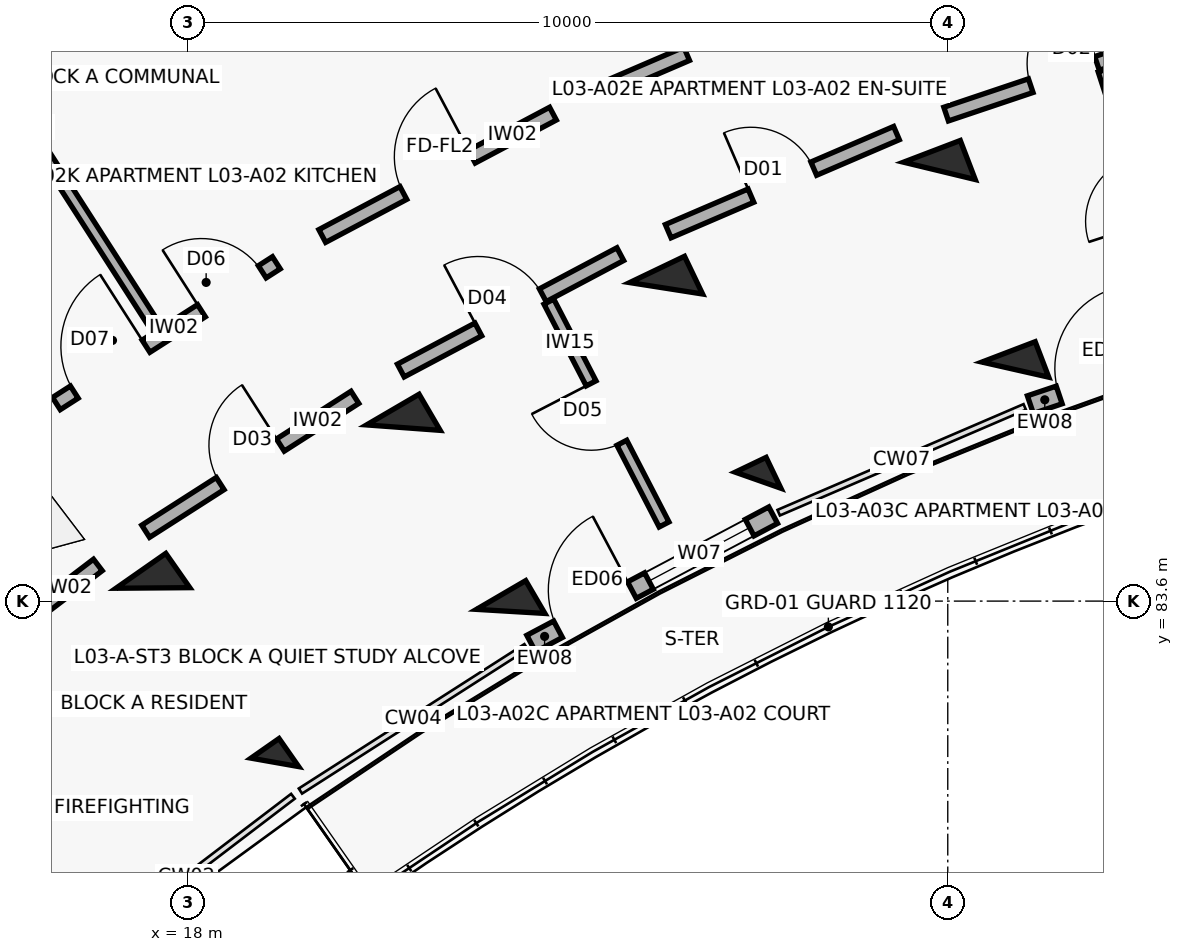
"""IFC4 building model, lengths in metres.
Left out: names, types, materials, properties, quantities, classifications, styles, units other than length and angle.
Written with IfcOpenShell. Run it as: python <this file> out.ifc"""

import sys

from ifc_helpers import new_model, si_unit, direction, frame, frame_2d, origin, origin_2d, place, context, subcontext, project, spatial, rectangle, extrude, element, fill, save


model = new_model("IFC4")
c1 = context("Model", 3, precision=1e-05, world=origin(), true_north=direction((0.0, 1.0)))
c2 = subcontext(c1, "Body", "Model", "MODEL_VIEW")
j1 = project(units=[si_unit("LENGTHUNIT", "METRE"), si_unit("PLANEANGLEUNIT", "RADIAN")], contexts=[c1])
p1 = place(None, origin())
s1 = spatial("IfcSite", under=j1, at=p1, CompositionType="ELEMENT")
p2 = place(p1, origin())
s2 = spatial("IfcBuilding", under=s1, at=p2, CompositionType="ELEMENT")
p3 = place(p2, frame((0.0, 0.0, 11.2)))
s3 = spatial("IfcBuildingStorey", under=s2, at=p3, CompositionType="ELEMENT", Elevation=11.2)
p4 = place(p3, frame((19.146, 81.478, 0.0), z_axis=(0.0, 0.0, 1.0), x_axis=(-0.573004420611, 0.819552276527, 0.0)))
e1 = element("IfcColumn", 1, at=p4, inside=s3, PredefinedType="COLUMN", context=c2, shape_type="SweptSolid", body=[
    extrude(rectangle(XDim=0.45, YDim=0.45, at=origin_2d()), origin(), (0.0, 0.0, 1.0), 3.1),
])
p5 = place(p3, frame((17.542, 83.773, 0.0), z_axis=(0.0, 0.0, 1.0), x_axis=(-0.573004420611, 0.819552276527, 0.0)))
e2 = element("IfcColumn", 2, at=p5, inside=s3, PredefinedType="COLUMN", context=c2, shape_type="SweptSolid", body=[
    extrude(rectangle(XDim=0.55, YDim=0.8, at=origin_2d()), origin(), (0.0, 0.0, 1.0), 3.1),
])
p6 = place(p3, frame((22.249, 83.464, 0.0), z_axis=(0.0, 0.0, 1.0), x_axis=(-0.504226211181, 0.863571611366, 0.0)))
e3 = element("IfcColumn", 3, at=p6, inside=s3, PredefinedType="COLUMN", context=c2, shape_type="SweptSolid", body=[
    extrude(rectangle(XDim=0.5, YDim=0.75, at=origin_2d()), origin(), (0.0, 0.0, 1.0), 3.1),
])
for number, where, z_axis, x_axis in (
    (4, (20.837, 85.882, 0.0), (0.0, 0.0, 1.0), (-0.504, 0.864, 0.0)),
    (5, (17.873, 90.96, 0.0), (0.0, 0.0, 1.0), (-0.504, 0.864, 0.0)),
):
    element("IfcColumn", number, at=place(p3, frame(where, z_axis=z_axis, x_axis=x_axis)), inside=s3, PredefinedType="COLUMN", context=c2, shape_type="SweptSolid", body=[
        extrude(rectangle(XDim=0.55, YDim=0.8, at=origin_2d()), origin(), (0.0, 0.0, 1.0), 3.1),
    ])
p7 = place(p3, frame((25.504, 85.191, 0.0), z_axis=(0.0, 0.0, 1.0), x_axis=(-0.432085748802, 0.901832526405, 0.0)))
e6 = element("IfcColumn", 6, at=p7, inside=s3, PredefinedType="COLUMN", context=c2, shape_type="SweptSolid", body=[
    extrude(rectangle(XDim=0.45, YDim=0.45, at=origin_2d()), origin(), (0.0, 0.0, 1.0), 3.1),
])
p8 = place(p3, frame((24.294, 87.716, 0.0), z_axis=(0.0, 0.0, 1.0), x_axis=(-0.432085748802, 0.901832526405, 0.0)))
e7 = element("IfcColumn", 7, at=p8, inside=s3, PredefinedType="COLUMN", context=c2, shape_type="SweptSolid", body=[
    extrude(rectangle(XDim=0.55, YDim=0.8, at=origin_2d()), origin(), (0.0, 0.0, 1.0), 3.1),
])
p9 = place(p3, frame((28.889, 86.646, 0.0), z_axis=(0.0, 0.0, 1.0), x_axis=(-0.357064076459, 0.934079892355, 0.0)))
e8 = element("IfcColumn", 8, at=p9, inside=s3, PredefinedType="COLUMN", context=c2, shape_type="SweptSolid", body=[
    extrude(rectangle(XDim=0.5, YDim=0.75, at=origin_2d()), origin(), (0.0, 0.0, 1.0), 3.1),
])
p10 = place(p3, frame((27.889, 89.261, 0.0), z_axis=(0.0, 0.0, 1.0), x_axis=(-0.357064076459, 0.934079892355, 0.0)))
e9 = element("IfcColumn", 9, at=p10, inside=s3, PredefinedType="COLUMN", context=c2, shape_type="SweptSolid", body=[
    extrude(rectangle(XDim=0.55, YDim=0.8, at=origin_2d()), origin(), (0.0, 0.0, 1.0), 3.1),
])
p11 = place(p3, frame((22.519, 83.042, 0.0), z_axis=(0.0, 0.0, 1.0), x_axis=(0.883438308286, 0.468547495407, 0.0)))
e10 = element("IfcWall", 10, at=p11, inside=s3, PredefinedType="SOLIDWALL", context=c2, shape_type="SweptSolid", body=[
    extrude(rectangle(XDim=3.604, YDim=0.245, at=frame_2d((1.802, 0.0))), origin(), (0.0, 0.0, 1.0), 2.25),
])
p12 = place(p11, frame((0.4, 0.0, 0.0)))
e11 = element("IfcOpeningElement", 11, at=p12, cuts=e10, PredefinedType="OPENING", context=c2, shape_type="SweptSolid", body=[
    extrude(rectangle(XDim=1.1, YDim=2.15, at=frame_2d((0.55, 1.075))), frame((0.0, 0.133, 0.0), z_axis=(0.0, -1.0, 0.0), x_axis=(1.0, 0.0, 0.0)), (0.0, 0.0, 1.0), 0.265),
])
p13 = place(p11, frame((1.754, 0.0, 0.35)))
e12 = element("IfcOpeningElement", 12, at=p13, cuts=e10, PredefinedType="OPENING", context=c2, shape_type="SweptSolid", body=[
    extrude(rectangle(XDim=1.5, YDim=1.65, at=frame_2d((0.75, 0.825))), frame((0.0, 0.133, 0.0), z_axis=(0.0, -1.0, 0.0), x_axis=(1.0, 0.0, 0.0)), (0.0, 0.0, 1.0), 0.265),
])
p14 = place(p3, frame((29.087, 86.185, 0.0), z_axis=(0.0, 0.0, 1.0), x_axis=(0.947880824442, 0.318625081649, 0.0)))
e13 = element("IfcWall", 13, at=p14, inside=s3, PredefinedType="SOLIDWALL", context=c2, shape_type="SweptSolid", body=[
    extrude(rectangle(XDim=3.604, YDim=0.245, at=frame_2d((1.802, 0.0))), origin(), (0.0, 0.0, 1.0), 2.25),
])
p15 = place(p14, frame((0.4, 0.0, 0.0)))
e14 = element("IfcOpeningElement", 14, at=p15, cuts=e13, PredefinedType="OPENING", context=c2, shape_type="SweptSolid", body=[
    extrude(rectangle(XDim=1.1, YDim=2.15, at=frame_2d((0.55, 1.075))), frame((0.0, 0.133, 0.0), z_axis=(0.0, -1.0, 0.0), x_axis=(1.0, 0.0, 0.0)), (0.0, 0.0, 1.0), 0.265),
])
p16 = place(p14, frame((1.754, 0.0, 0.35)))
e15 = element("IfcOpeningElement", 15, at=p16, cuts=e13, PredefinedType="OPENING", context=c2, shape_type="SweptSolid", body=[
    extrude(rectangle(XDim=1.5, YDim=1.65, at=frame_2d((0.75, 0.825))), frame((0.0, 0.133, 0.0), z_axis=(0.0, -1.0, 0.0), x_axis=(1.0, 0.0, 0.0)), (0.0, 0.0, 1.0), 0.265),
])
p17 = place(p3, frame((14.329, 82.18, 0.0), z_axis=(0.0, 0.0, 1.0), x_axis=(0.795501577908, 0.605951515838, 0.0)))
e16 = element("IfcWall", 16, at=p17, inside=s3, PredefinedType="SOLIDWALL", context=c2, shape_type="SweptSolid", body=[
    extrude(rectangle(XDim=3.129, YDim=0.19, at=frame_2d((1.564, 0.0))), origin(), (0.0, 0.0, 1.0), 2.08),
])
p18 = place(p17, frame((1.004, 0.0, 0.0)))
e17 = element("IfcOpeningElement", 17, at=p18, cuts=e16, PredefinedType="OPENING", context=c2, shape_type="SweptSolid", body=[
    extrude(rectangle(XDim=1.12, YDim=2.15, at=frame_2d((0.56, 1.075))), frame((0.0, 0.105, 0.0), z_axis=(0.0, -1.0, 0.0), x_axis=(1.0, 0.0, 0.0)), (0.0, 0.0, 1.0), 0.21),
])
p19 = place(p3, frame((16.272, 86.199, 0.0), z_axis=(0.0, 0.0, 1.0), x_axis=(0.842257205985, 0.539075874963, 0.0)))
e18 = element("IfcWall", 18, at=p19, inside=s3, PredefinedType="SOLIDWALL", context=c2, shape_type="SweptSolid", body=[
    extrude(rectangle(XDim=3.436, YDim=0.19, at=frame_2d((1.718, 0.0))), origin(), (0.0, 0.0, 1.0), 2.08),
])
p20 = place(p19, frame((0.28, 0.0, 0.0)))
e19 = element("IfcOpeningElement", 19, at=p20, cuts=e18, PredefinedType="OPENING", context=c2, shape_type="SweptSolid", body=[
    extrude(rectangle(XDim=1.12, YDim=2.15, at=frame_2d((0.56, 1.075))), frame((0.0, 0.105, 0.0), z_axis=(0.0, -1.0, 0.0), x_axis=(1.0, 0.0, 0.0)), (0.0, 0.0, 1.0), 0.21),
])
p21 = place(p19, frame((2.266, 0.0, 0.0)))
e20 = element("IfcOpeningElement", 20, at=p21, cuts=e18, PredefinedType="OPENING", context=c2, shape_type="SweptSolid", body=[
    extrude(rectangle(XDim=0.95, YDim=2.1, at=frame_2d((0.475, 1.05))), frame((0.0, 0.105, 0.0), z_axis=(0.0, -1.0, 0.0), x_axis=(1.0, 0.0, 0.0)), (0.0, 0.0, 1.0), 0.21),
])
p22 = place(p3, frame((17.447, 84.519, 0.0), z_axis=(0.0, 0.0, 1.0), x_axis=(0.842225276846, 0.539125758095, 0.0)))
e21 = element("IfcWall", 21, at=p22, inside=s3, PredefinedType="SOLIDWALL", context=c2, shape_type="SweptSolid", body=[
    extrude(rectangle(XDim=3.269, YDim=0.19, at=frame_2d((1.634, 0.0))), origin(), (0.0, 0.0, 1.0), 2.08),
])
p23 = place(p22, frame((1.164, 0.0, 0.0)))
e22 = element("IfcOpeningElement", 22, at=p23, cuts=e21, PredefinedType="OPENING", context=c2, shape_type="SweptSolid", body=[
    extrude(rectangle(XDim=0.94, YDim=2.1, at=frame_2d((0.47, 1.05))), frame((0.0, 0.105, 0.0), z_axis=(0.0, -1.0, 0.0), x_axis=(1.0, 0.0, 0.0)), (0.0, 0.0, 1.0), 0.21),
])
p24 = place(p3, frame((17.524, 87.288, 0.0), z_axis=(0.0, 0.0, 1.0), x_axis=(-0.540338452216, 0.841447774408, 0.0)))
e23 = element("IfcWall", 23, at=p24, inside=s3, PredefinedType="PARTITIONING", context=c2, shape_type="SweptSolid", body=[
    extrude(rectangle(XDim=7.95, YDim=0.14, at=frame_2d((3.975, 0.0))), origin(), (0.0, 0.0, 1.0), 2.08),
])
p25 = place(p24, frame((6.05, 0.0, 0.0)))
e24 = element("IfcOpeningElement", 24, at=p25, cuts=e23, PredefinedType="OPENING", context=c2, shape_type="SweptSolid", body=[
    extrude(rectangle(XDim=0.92, YDim=2.1, at=frame_2d((0.46, 1.05))), frame((0.0, 0.08, 0.0), z_axis=(0.0, -1.0, 0.0), x_axis=(1.0, 0.0, 0.0)), (0.0, 0.0, 1.0), 0.16),
])
p26 = place(p3, frame((19.77, 88.404, 0.0), z_axis=(0.0, 0.0, 1.0), x_axis=(0.883410853063, 0.468599258099, 0.0)))
e25 = element("IfcWall", 25, at=p26, inside=s3, PredefinedType="SOLIDWALL", context=c2, shape_type="SweptSolid", body=[
    extrude(rectangle(XDim=3.436, YDim=0.19, at=frame_2d((1.718, 0.0))), origin(), (0.0, 0.0, 1.0), 2.08),
])
p27 = place(p26, frame((1.208, 0.0, 0.0)))
e26 = element("IfcOpeningElement", 26, at=p27, cuts=e25, PredefinedType="OPENING", context=c2, shape_type="SweptSolid", body=[
    extrude(rectangle(XDim=1.02, YDim=2.15, at=frame_2d((0.51, 1.075))), frame((0.0, 0.105, 0.0), z_axis=(0.0, -1.0, 0.0), x_axis=(1.0, 0.0, 0.0)), (0.0, 0.0, 1.0), 0.21),
])
p28 = place(p3, frame((20.804, 86.634, 0.0), z_axis=(0.0, 0.0, 1.0), x_axis=(0.883444301944, 0.468536194293, 0.0)))
e27 = element("IfcWall", 27, at=p28, inside=s3, PredefinedType="SOLIDWALL", context=c2, shape_type="SweptSolid", body=[
    extrude(rectangle(XDim=3.269, YDim=0.19, at=frame_2d((1.634, 0.0))), origin(), (0.0, 0.0, 1.0), 2.08),
])
p29 = place(p28, frame((1.154, 0.0, 0.0)))
e28 = element("IfcOpeningElement", 28, at=p29, cuts=e27, PredefinedType="OPENING", context=c2, shape_type="SweptSolid", body=[
    extrude(rectangle(XDim=0.96, YDim=2.1, at=frame_2d((0.48, 1.05))), frame((0.0, 0.105, 0.0), z_axis=(0.0, -1.0, 0.0), x_axis=(1.0, 0.0, 0.0)), (0.0, 0.0, 1.0), 0.21),
])
p30 = place(p3, frame((24.267, 84.608, 0.0), z_axis=(0.0, 0.0, 1.0), x_axis=(-0.459217611894, 0.888323806349, 0.0)))
e29 = element("IfcWall", 29, at=p30, inside=s3, PredefinedType="PARTITIONING", context=c2, shape_type="SweptSolid", body=[
    extrude(rectangle(XDim=3.3, YDim=0.145, at=frame_2d((1.65, 0.0))), origin(), (0.0, 0.0, 1.0), 2.08),
])
p31 = place(p30, frame((1.21, 0.0, 0.0)))
e30 = element("IfcOpeningElement", 30, at=p31, cuts=e29, PredefinedType="OPENING", context=c2, shape_type="SweptSolid", body=[
    extrude(rectangle(XDim=0.88, YDim=2.1, at=frame_2d((0.44, 1.05))), frame((0.0, 0.083, 0.0), z_axis=(0.0, -1.0, 0.0), x_axis=(1.0, 0.0, 0.0)), (0.0, 0.0, 1.0), 0.165),
])
p32 = place(p3, frame((23.437, 90.316, 0.0), z_axis=(0.0, 0.0, 1.0), x_axis=(0.918718172399, 0.394913813008, 0.0)))
e31 = element("IfcWall", 31, at=p32, inside=s3, PredefinedType="SOLIDWALL", context=c2, shape_type="SweptSolid", body=[
    extrude(rectangle(XDim=3.436, YDim=0.19, at=frame_2d((1.718, 0.0))), origin(), (0.0, 0.0, 1.0), 2.08),
])
p33 = place(p32, frame((1.228, 0.0, 0.0)))
e32 = element("IfcOpeningElement", 32, at=p33, cuts=e31, PredefinedType="OPENING", context=c2, shape_type="SweptSolid", body=[
    extrude(rectangle(XDim=0.98, YDim=2.15, at=frame_2d((0.49, 1.075))), frame((0.0, 0.105, 0.0), z_axis=(0.0, -1.0, 0.0), x_axis=(1.0, 0.0, 0.0)), (0.0, 0.0, 1.0), 0.21),
])
p34 = place(p3, frame((24.322, 88.467, 0.0), z_axis=(0.0, 0.0, 1.0), x_axis=(0.918723391052, 0.394901672235, 0.0)))
e33 = element("IfcWall", 33, at=p34, inside=s3, PredefinedType="SOLIDWALL", context=c2, shape_type="SweptSolid", body=[
    extrude(rectangle(XDim=3.269, YDim=0.19, at=frame_2d((1.634, 0.0))), origin(), (0.0, 0.0, 1.0), 2.08),
])
p35 = place(p34, frame((1.184, 0.0, 0.0)))
e34 = element("IfcOpeningElement", 34, at=p35, cuts=e33, PredefinedType="OPENING", context=c2, shape_type="SweptSolid", body=[
    extrude(rectangle(XDim=0.9, YDim=2.1, at=frame_2d((0.45, 1.05))), frame((0.0, 0.105, 0.0), z_axis=(0.0, -1.0, 0.0), x_axis=(1.0, 0.0, 0.0)), (0.0, 0.0, 1.0), 0.21),
])
p36 = place(p3, frame((27.979, 90.008, 0.0), z_axis=(0.0, 0.0, 1.0), x_axis=(0.94787351033, 0.318646839643, 0.0)))
e35 = element("IfcWall", 35, at=p36, inside=s3, PredefinedType="SOLIDWALL", context=c2, shape_type="SweptSolid", body=[
    extrude(rectangle(XDim=3.269, YDim=0.19, at=frame_2d((1.634, 0.0))), origin(), (0.0, 0.0, 1.0), 2.08),
])
p37 = place(p36, frame((1.174, 0.0, 0.0)))
e36 = element("IfcOpeningElement", 36, at=p37, cuts=e35, PredefinedType="OPENING", context=c2, shape_type="SweptSolid", body=[
    extrude(rectangle(XDim=0.92, YDim=2.1, at=frame_2d((0.46, 1.05))), frame((0.0, 0.105, 0.0), z_axis=(0.0, -1.0, 0.0), x_axis=(1.0, 0.0, 0.0)), (0.0, 0.0, 1.0), 0.21),
])
p38 = place(p3, frame((31.066, 87.446, 0.0), z_axis=(0.0, 0.0, 1.0), x_axis=(-0.308582493915, 0.951197584337, 0.0)))
e37 = element("IfcWall", 37, at=p38, inside=s3, PredefinedType="PARTITIONING", context=c2, shape_type="SweptSolid", body=[
    extrude(rectangle(XDim=3.3, YDim=0.145, at=frame_2d((1.65, 0.0))), origin(), (0.0, 0.0, 1.0), 2.08),
])
p39 = place(p38, frame((1.21, 0.0, 0.0)))
e38 = element("IfcOpeningElement", 38, at=p39, cuts=e37, PredefinedType="OPENING", context=c2, shape_type="SweptSolid", body=[
    extrude(rectangle(XDim=0.88, YDim=2.1, at=frame_2d((0.44, 1.05))), frame((0.0, 0.083, 0.0), z_axis=(0.0, -1.0, 0.0), x_axis=(1.0, 0.0, 0.0)), (0.0, 0.0, 1.0), 0.165),
])
p40 = place(p12, origin())
e39 = element("IfcDoor", 39, at=p40, inside=s3, OperationType="SINGLE_SWING_RIGHT", PredefinedType="DOOR", context=c2, shape_type="SweptSolid", body=[
    extrude(rectangle(XDim=1.1, YDim=2.15, at=frame_2d((0.55, 1.075))), frame((0.0, 0.025, 0.0), z_axis=(0.0, -1.0, 0.0), x_axis=(1.0, 0.0, 0.0)), (0.0, 0.0, 1.0), 0.05),
])
fill(e11, e39)
p41 = place(p13, origin())
e40 = element("IfcWindow", 40, at=p41, inside=s3, PartitioningType="DOUBLE_PANEL_VERTICAL", PredefinedType="WINDOW", context=c2, shape_type="SweptSolid", body=[
    extrude(rectangle(XDim=1.5, YDim=1.65, at=frame_2d((0.75, 0.825))), frame((0.0, 0.03, 0.0), z_axis=(0.0, -1.0, 0.0), x_axis=(1.0, 0.0, 0.0)), (0.0, 0.0, 1.0), 0.06),
])
fill(e12, e40)
p42 = place(p15, origin())
e41 = element("IfcDoor", 41, at=p42, inside=s3, OperationType="SINGLE_SWING_RIGHT", PredefinedType="DOOR", context=c2, shape_type="SweptSolid", body=[
    extrude(rectangle(XDim=1.1, YDim=2.15, at=frame_2d((0.55, 1.075))), frame((0.0, 0.025, 0.0), z_axis=(0.0, -1.0, 0.0), x_axis=(1.0, 0.0, 0.0)), (0.0, 0.0, 1.0), 0.05),
])
fill(e14, e41)
p43 = place(p20, origin())
e42 = element("IfcDoor", 42, at=p43, inside=s3, OperationType="SINGLE_SWING_RIGHT", PredefinedType="DOOR", context=c2, shape_type="SweptSolid", body=[
    extrude(rectangle(XDim=1.12, YDim=2.15, at=frame_2d((0.56, 1.075))), frame((0.0, 0.025, 0.0), z_axis=(0.0, -1.0, 0.0), x_axis=(1.0, 0.0, 0.0)), (0.0, 0.0, 1.0), 0.05),
])
fill(e19, e42)
p44 = place(p21, origin())
e43 = element("IfcDoor", 43, at=p44, inside=s3, OperationType="SINGLE_SWING_LEFT", PredefinedType="DOOR", context=c2, shape_type="SweptSolid", body=[
    extrude(rectangle(XDim=0.95, YDim=2.1, at=frame_2d((0.475, 1.05))), frame((0.0, 0.025, 0.0), z_axis=(0.0, -1.0, 0.0), x_axis=(1.0, 0.0, 0.0)), (0.0, 0.0, 1.0), 0.05),
])
fill(e20, e43)
p45 = place(p23, origin())
e44 = element("IfcDoor", 44, at=p45, inside=s3, OperationType="SINGLE_SWING_RIGHT", PredefinedType="DOOR", context=c2, shape_type="SweptSolid", body=[
    extrude(rectangle(XDim=0.94, YDim=2.1, at=frame_2d((0.47, 1.05))), frame((0.0, 0.025, 0.0), z_axis=(0.0, -1.0, 0.0), x_axis=(1.0, 0.0, 0.0)), (0.0, 0.0, 1.0), 0.05),
])
fill(e22, e44)
p46 = place(p27, origin())
e45 = element("IfcDoor", 45, at=p46, inside=s3, OperationType="SINGLE_SWING_RIGHT", PredefinedType="DOOR", context=c2, shape_type="SweptSolid", body=[
    extrude(rectangle(XDim=1.02, YDim=2.15, at=frame_2d((0.51, 1.075))), frame((0.0, 0.025, 0.0), z_axis=(0.0, -1.0, 0.0), x_axis=(1.0, 0.0, 0.0)), (0.0, 0.0, 1.0), 0.05),
])
fill(e26, e45)
p47 = place(p29, origin())
e46 = element("IfcDoor", 46, at=p47, inside=s3, OperationType="SINGLE_SWING_LEFT", PredefinedType="DOOR", context=c2, shape_type="SweptSolid", body=[
    extrude(rectangle(XDim=0.96, YDim=2.1, at=frame_2d((0.48, 1.05))), frame((0.0, 0.025, 0.0), z_axis=(0.0, -1.0, 0.0), x_axis=(1.0, 0.0, 0.0)), (0.0, 0.0, 1.0), 0.05),
])
fill(e28, e46)
p48 = place(p31, origin())
e47 = element("IfcDoor", 47, at=p48, inside=s3, OperationType="SINGLE_SWING_RIGHT", PredefinedType="DOOR", context=c2, shape_type="SweptSolid", body=[
    extrude(rectangle(XDim=0.88, YDim=2.1, at=frame_2d((0.44, 1.05))), frame((0.0, 0.025, 0.0), z_axis=(0.0, -1.0, 0.0), x_axis=(1.0, 0.0, 0.0)), (0.0, 0.0, 1.0), 0.05),
])
fill(e30, e47)
p49 = place(p33, origin())
e48 = element("IfcDoor", 48, at=p49, inside=s3, OperationType="SINGLE_SWING_RIGHT", PredefinedType="DOOR", context=c2, shape_type="SweptSolid", body=[
    extrude(rectangle(XDim=0.98, YDim=2.15, at=frame_2d((0.49, 1.075))), frame((0.0, 0.025, 0.0), z_axis=(0.0, -1.0, 0.0), x_axis=(1.0, 0.0, 0.0)), (0.0, 0.0, 1.0), 0.05),
])
fill(e32, e48)
p50 = place(p35, origin())
e49 = element("IfcDoor", 49, at=p50, inside=s3, OperationType="SINGLE_SWING_LEFT", PredefinedType="DOOR", context=c2, shape_type="SweptSolid", body=[
    extrude(rectangle(XDim=0.9, YDim=2.1, at=frame_2d((0.45, 1.05))), frame((0.0, 0.025, 0.0), z_axis=(0.0, -1.0, 0.0), x_axis=(1.0, 0.0, 0.0)), (0.0, 0.0, 1.0), 0.05),
])
fill(e34, e49)
p51 = place(p37, origin())
e50 = element("IfcDoor", 50, at=p51, inside=s3, OperationType="SINGLE_SWING_RIGHT", PredefinedType="DOOR", context=c2, shape_type="SweptSolid", body=[
    extrude(rectangle(XDim=0.92, YDim=2.1, at=frame_2d((0.46, 1.05))), frame((0.0, 0.025, 0.0), z_axis=(0.0, -1.0, 0.0), x_axis=(1.0, 0.0, 0.0)), (0.0, 0.0, 1.0), 0.05),
])
fill(e36, e50)
save(model, sys.argv[1])
